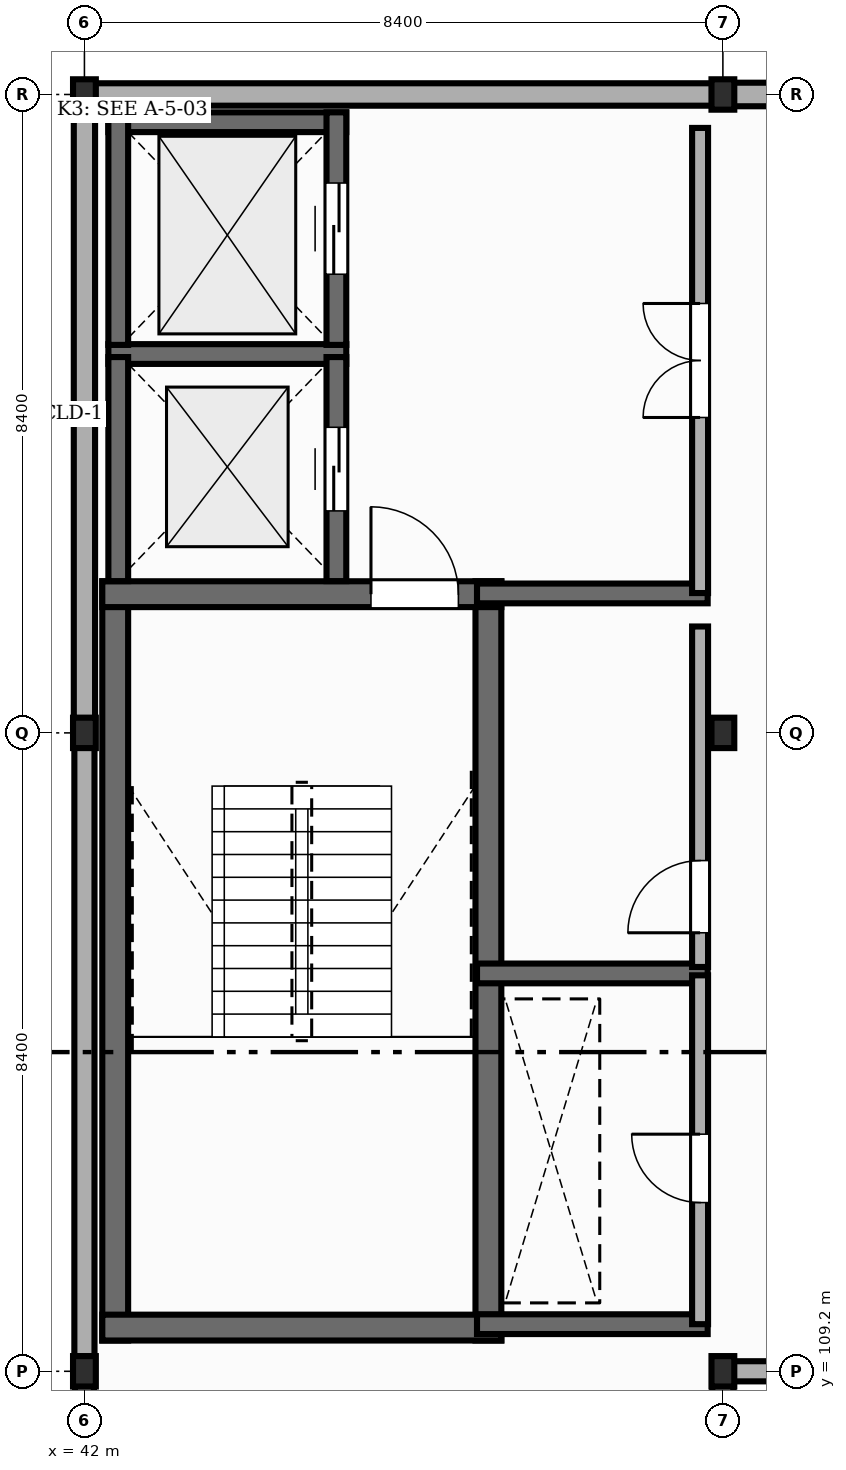
"""IFC4 building model, lengths in metres.
Left out: names, types, materials, properties, quantities, classifications, styles, units other than length and angle.
Written with IfcOpenShell. Run it as: python <this file> out.ifc"""

import sys

from ifc_helpers import new_model, si_unit, direction, frame, frame_2d, origin, origin_2d, place, context, subcontext, project, spatial, rectangle, i_section, extrude, element, fill, save


model = new_model("IFC4")
c1 = context("Model", 3, precision=1e-05, world=origin(), true_north=direction((0.0, 1.0)))
c2 = subcontext(c1, "Body", "Model", "MODEL_VIEW")
j1 = project(units=[si_unit("LENGTHUNIT", "METRE"), si_unit("PLANEANGLEUNIT", "RADIAN")], contexts=[c1])
p1 = place(None, origin())
s1 = spatial("IfcSite", under=j1, at=p1, CompositionType="ELEMENT")
p2 = place(p1, origin())
s2 = spatial("IfcBuilding", under=s1, at=p2, CompositionType="ELEMENT")
p3 = place(p2, frame((0.0, 0.0, 18.0)))
s3 = spatial("IfcBuildingStorey", under=s2, at=p3, CompositionType="ELEMENT", Elevation=18.0)
for number, where, z_axis, x_axis in (
    (1, (42.0, 109.2, 0.0), (0.0, 0.0, 1.0), (1.0, 0.0, 0.0)),
    (2, (42.0, 117.6, 0.0), (0.0, 0.0, 1.0), (1.0, 0.0, 0.0)),
    (3, (42.0, 126.0, 0.0), (0.0, 0.0, 1.0), (1.0, 0.0, 0.0)),
    (4, (50.4, 109.2, 0.0), (0.0, 0.0, 1.0), (1.0, 0.0, 0.0)),
    (5, (50.4, 117.6, 0.0), (0.0, 0.0, 1.0), (1.0, 0.0, 0.0)),
    (6, (50.4, 126.0, 0.0), (0.0, 0.0, 1.0), (1.0, 0.0, 0.0)),
):
    element("IfcColumn", number, at=place(p3, frame(where, z_axis=z_axis, x_axis=x_axis)), inside=s3, PredefinedType="COLUMN", context=c2, shape_type="SweptSolid", body=[
        extrude(i_section(OverallWidth=0.3, OverallDepth=0.4, WebThickness=0.013, FlangeThickness=0.024, FilletRadius=0.027, at=origin_2d()), origin(), (0.0, 0.0, 1.0), 4.05),
    ])
p4 = place(p3, frame((58.792, 126.0, 0.0), z_axis=(0.0, 0.0, 1.0), x_axis=(-1.0, 0.0, 0.0)))
e7 = element("IfcWall", 7, at=p4, inside=s3, PredefinedType="STANDARD", context=c2, shape_type="SweptSolid", body=[
    extrude(rectangle(XDim=8.384, YDim=0.31, at=frame_2d((4.192, 0.0))), origin(), (0.0, 0.0, 1.0), 3.522),
])
p5 = place(p3, frame((50.392, 126.0, 0.0), z_axis=(0.0, 0.0, 1.0), x_axis=(-1.0, 0.0, 0.0)))
e8 = element("IfcWall", 8, at=p5, inside=s3, PredefinedType="STANDARD", context=c2, shape_type="SweptSolid", body=[
    extrude(rectangle(XDim=8.384, YDim=0.295, at=frame_2d((4.192, 0.0))), origin(), (0.0, 0.0, 1.0), 3.492),
])
p6 = place(p3, frame((42.0, 125.804, 0.0), z_axis=(0.0, 0.0, 1.0), x_axis=(0.0, -1.0, 0.0)))
e9 = element("IfcWall", 9, at=p6, inside=s3, PredefinedType="STANDARD", context=c2, shape_type="SweptSolid", body=[
    extrude(rectangle(XDim=8.008, YDim=0.28, at=frame_2d((4.004, 0.0))), origin(), (0.0, 0.0, 1.0), 3.582),
])
p7 = place(p3, frame((42.0, 117.404, 0.0), z_axis=(0.0, 0.0, 1.0), x_axis=(0.0, -1.0, 0.0)))
e10 = element("IfcWall", 10, at=p7, inside=s3, PredefinedType="STANDARD", context=c2, shape_type="SweptSolid", body=[
    extrude(rectangle(XDim=8.008, YDim=0.265, at=frame_2d((4.004, 0.0))), origin(), (0.0, 0.0, 1.0), 3.492),
])
p8 = place(p3, frame((42.0, 109.004, 0.0), z_axis=(0.0, 0.0, 1.0), x_axis=(0.0, -1.0, 0.0)))
e11 = element("IfcWall", 11, at=p8, inside=s3, PredefinedType="STANDARD", context=c2, shape_type="SweptSolid", body=[
    extrude(rectangle(XDim=8.058, YDim=0.25, at=frame_2d((4.029, 0.0))), origin(), (0.0, 0.0, 1.0), 3.562),
])
p9 = place(p3, frame((50.4, 100.946, 0.0), z_axis=(0.0, 0.0, 1.0), x_axis=(0.0, 1.0, 0.0)))
e12 = element("IfcWall", 12, at=p9, inside=s3, PredefinedType="STANDARD", context=c2, shape_type="SweptSolid", body=[
    extrude(rectangle(XDim=8.058, YDim=0.28, at=frame_2d((4.029, 0.0))), origin(), (0.0, 0.0, 1.0), 3.472),
])
p10 = place(p3, frame((50.408, 109.2, 0.0), z_axis=(0.0, 0.0, 1.0), x_axis=(1.0, 0.0, 0.0)))
e13 = element("IfcWall", 13, at=p10, inside=s3, PredefinedType="STANDARD", context=c2, shape_type="SweptSolid", body=[
    extrude(rectangle(XDim=8.384, YDim=0.265, at=frame_2d((4.192, 0.0))), origin(), (0.0, 0.0, 1.0), 3.522),
])
for number, where, z_axis, x_axis in (
    (14, (42.405, 109.605, 0.0), (0.0, 0.0, 1.0), (0.0, 1.0, 0.0)),
    (15, (47.315, 109.605, 0.0), (0.0, 0.0, 1.0), (0.0, 1.0, 0.0)),
):
    element("IfcWall", number, at=place(p3, frame(where, z_axis=z_axis, x_axis=x_axis)), inside=s3, PredefinedType="SHEAR", context=c2, shape_type="SweptSolid", body=[
        extrude(rectangle(XDim=9.99, YDim=0.34, at=frame_2d((4.995, 0.0))), origin(), (0.0, 0.0, 1.0), 3.85),
    ])
p11 = place(p3, frame((42.235, 109.775, 0.0), z_axis=(0.0, 0.0, 1.0), x_axis=(1.0, 0.0, 0.0)))
e16 = element("IfcWall", 16, at=p11, inside=s3, PredefinedType="SHEAR", context=c2, shape_type="SweptSolid", body=[
    extrude(rectangle(XDim=5.25, YDim=0.34, at=frame_2d((2.625, 0.0))), origin(), (0.0, 0.0, 1.0), 3.85),
])
p12 = place(p3, frame((42.235, 119.425, 0.0), z_axis=(0.0, 0.0, 1.0), x_axis=(1.0, 0.0, 0.0)))
e17 = element("IfcWall", 17, at=p12, inside=s3, PredefinedType="SHEAR", context=c2, shape_type="SweptSolid", body=[
    extrude(rectangle(XDim=5.25, YDim=0.34, at=frame_2d((2.625, 0.0))), origin(), (0.0, 0.0, 1.0), 3.85),
])
p13 = place(p12, frame((3.535, 0.0, 0.0)))
e18 = element("IfcOpeningElement", 18, at=p13, cuts=e17, PredefinedType="OPENING", context=c2, shape_type="SweptSolid", body=[
    extrude(rectangle(XDim=1.15, YDim=2.15, at=frame_2d((0.575, 1.075))), frame((0.0, 0.18, 0.0), z_axis=(0.0, -1.0, 0.0), x_axis=(1.0, 0.0, 0.0)), (0.0, 0.0, 1.0), 0.36),
])
p14 = place(p3, frame((42.315, 122.585, 0.0), z_axis=(0.0, 0.0, 1.0), x_axis=(1.0, 0.0, 0.0)))
e19 = element("IfcWall", 19, at=p14, inside=s3, PredefinedType="SHEAR", context=c2, shape_type="SweptSolid", body=[
    extrude(rectangle(XDim=3.13, YDim=0.26, at=frame_2d((1.565, 0.0))), origin(), (0.0, 0.0, 1.0), 3.85),
])
p15 = place(p3, frame((42.445, 119.597, 0.0), z_axis=(0.0, 0.0, 1.0), x_axis=(0.0, 1.0, 0.0)))
e20 = element("IfcWall", 20, at=p15, inside=s3, PredefinedType="SHEAR", context=c2, shape_type="SweptSolid", body=[
    extrude(rectangle(XDim=2.948, YDim=0.26, at=frame_2d((1.474, 0.0))), origin(), (0.0, 0.0, 1.0), 3.85),
])
p16 = place(p3, frame((45.315, 119.597, 0.0), z_axis=(0.0, 0.0, 1.0), x_axis=(0.0, 1.0, 0.0)))
e21 = element("IfcWall", 21, at=p16, inside=s3, PredefinedType="SHEAR", context=c2, shape_type="SweptSolid", body=[
    extrude(rectangle(XDim=2.948, YDim=0.26, at=frame_2d((1.474, 0.0))), origin(), (0.0, 0.0, 1.0), 3.85),
])
p17 = place(p16, frame((0.924, 0.0, 0.0)))
e22 = element("IfcOpeningElement", 22, at=p17, cuts=e21, PredefinedType="OPENING", context=c2, shape_type="SweptSolid", body=[
    extrude(rectangle(XDim=1.1, YDim=2.15, at=frame_2d((0.55, 1.075))), frame((0.0, 0.14, 0.0), z_axis=(0.0, -1.0, 0.0), x_axis=(1.0, 0.0, 0.0)), (0.0, 0.0, 1.0), 0.28),
])
p18 = place(p3, frame((42.315, 125.635, 0.0), z_axis=(0.0, 0.0, 1.0), x_axis=(1.0, 0.0, 0.0)))
e23 = element("IfcWall", 23, at=p18, inside=s3, PredefinedType="SHEAR", context=c2, shape_type="SweptSolid", body=[
    extrude(rectangle(XDim=3.13, YDim=0.26, at=frame_2d((1.565, 0.0))), origin(), (0.0, 0.0, 1.0), 3.85),
])
p19 = place(p3, frame((42.445, 122.705, 0.0), z_axis=(0.0, 0.0, 1.0), x_axis=(0.0, 1.0, 0.0)))
e24 = element("IfcWall", 24, at=p19, inside=s3, PredefinedType="SHEAR", context=c2, shape_type="SweptSolid", body=[
    extrude(rectangle(XDim=3.06, YDim=0.26, at=frame_2d((1.53, 0.0))), origin(), (0.0, 0.0, 1.0), 3.85),
])
p20 = place(p3, frame((45.315, 122.705, 0.0), z_axis=(0.0, 0.0, 1.0), x_axis=(0.0, 1.0, 0.0)))
e25 = element("IfcWall", 25, at=p20, inside=s3, PredefinedType="SHEAR", context=c2, shape_type="SweptSolid", body=[
    extrude(rectangle(XDim=3.06, YDim=0.26, at=frame_2d((1.53, 0.0))), origin(), (0.0, 0.0, 1.0), 3.85),
])
p21 = place(p20, frame((0.93, 0.0, 0.0)))
e26 = element("IfcOpeningElement", 26, at=p21, cuts=e25, PredefinedType="OPENING", context=c2, shape_type="SweptSolid", body=[
    extrude(rectangle(XDim=1.2, YDim=2.15, at=frame_2d((0.6, 1.075))), frame((0.0, 0.14, 0.0), z_axis=(0.0, -1.0, 0.0), x_axis=(1.0, 0.0, 0.0)), (0.0, 0.0, 1.0), 0.28),
])
for number, where, z_axis, x_axis in (
    (27, (47.165, 109.82, 0.0), (0.0, 0.0, 1.0), (1.0, 0.0, 0.0)),
    (28, (47.165, 114.435, 0.0), (0.0, 0.0, 1.0), (1.0, 0.0, 0.0)),
    (29, (47.165, 119.435, 0.0), (0.0, 0.0, 1.0), (1.0, 0.0, 0.0)),
):
    element("IfcWall", number, at=place(p3, frame(where, z_axis=z_axis, x_axis=x_axis)), inside=s3, PredefinedType="SHEAR", context=c2, shape_type="SweptSolid", body=[
        extrude(rectangle(XDim=3.035, YDim=0.26, at=frame_2d((1.518, 0.0))), origin(), (0.0, 0.0, 1.0), 3.85),
    ])
p22 = place(p3, frame((50.1, 109.82, 0.0), z_axis=(0.0, 0.0, 1.0), x_axis=(0.0, 1.0, 0.0)))
e30 = element("IfcWall", 30, at=p22, inside=s3, PredefinedType="STANDARD", context=c2, shape_type="SweptSolid", body=[
    extrude(rectangle(XDim=4.59, YDim=0.21, at=frame_2d((2.295, 0.0))), origin(), (0.0, 0.0, 1.0), 3.252),
])
p23 = place(p22, frame((1.6, 0.0, 0.0)))
e31 = element("IfcOpeningElement", 31, at=p23, cuts=e30, PredefinedType="OPENING", context=c2, shape_type="SweptSolid", body=[
    extrude(rectangle(XDim=0.9, YDim=2.1, at=frame_2d((0.45, 1.05))), frame((0.0, 0.115, 0.0), z_axis=(0.0, -1.0, 0.0), x_axis=(1.0, 0.0, 0.0)), (0.0, 0.0, 1.0), 0.23),
])
p24 = place(p3, frame((50.1, 114.52, 0.0), z_axis=(0.0, 0.0, 1.0), x_axis=(0.0, 1.0, 0.0)))
e32 = element("IfcWall", 32, at=p24, inside=s3, PredefinedType="STANDARD", context=c2, shape_type="SweptSolid", body=[
    extrude(rectangle(XDim=4.48, YDim=0.21, at=frame_2d((2.24, 0.0))), origin(), (0.0, 0.0, 1.0), 3.252),
])
p25 = place(p24, frame((0.45, 0.0, 0.0)))
e33 = element("IfcOpeningElement", 33, at=p25, cuts=e32, PredefinedType="OPENING", context=c2, shape_type="SweptSolid", body=[
    extrude(rectangle(XDim=0.95, YDim=2.15, at=frame_2d((0.475, 1.075))), frame((0.0, 0.115, 0.0), z_axis=(0.0, -1.0, 0.0), x_axis=(1.0, 0.0, 0.0)), (0.0, 0.0, 1.0), 0.23),
])
p26 = place(p3, frame((50.1, 119.44, 0.0), z_axis=(0.0, 0.0, 1.0), x_axis=(0.0, 1.0, 0.0)))
e34 = element("IfcWall", 34, at=p26, inside=s3, PredefinedType="STANDARD", context=c2, shape_type="SweptSolid", body=[
    extrude(rectangle(XDim=6.12, YDim=0.21, at=frame_2d((3.06, 0.0))), origin(), (0.0, 0.0, 1.0), 3.362),
])
p27 = place(p26, frame((2.31, 0.0, 0.0)))
e35 = element("IfcOpeningElement", 35, at=p27, cuts=e34, PredefinedType="OPENING", context=c2, shape_type="SweptSolid", body=[
    extrude(rectangle(XDim=1.5, YDim=2.2, at=frame_2d((0.75, 1.1))), frame((0.0, 0.115, 0.0), z_axis=(0.0, -1.0, 0.0), x_axis=(1.0, 0.0, 0.0)), (0.0, 0.0, 1.0), 0.23),
])
p28 = place(p13, origin())
e36 = element("IfcDoor", 36, at=p28, inside=s3, OperationType="SINGLE_SWING_LEFT", PredefinedType="DOOR", context=c2, shape_type="SweptSolid", body=[
    extrude(rectangle(XDim=1.15, YDim=2.15, at=frame_2d((0.575, 1.075))), frame((0.0, 0.025, 0.0), z_axis=(0.0, -1.0, 0.0), x_axis=(1.0, 0.0, 0.0)), (0.0, 0.0, 1.0), 0.05),
])
fill(e18, e36)
p29 = place(p17, origin())
e37 = element("IfcDoor", 37, at=p29, inside=s3, OperationType="DOUBLE_DOOR_SLIDING", PredefinedType="DOOR", context=c2, shape_type="SweptSolid", body=[
    extrude(rectangle(XDim=1.1, YDim=2.15, at=frame_2d((0.55, 1.075))), frame((0.0, 0.025, 0.0), z_axis=(0.0, -1.0, 0.0), x_axis=(1.0, 0.0, 0.0)), (0.0, 0.0, 1.0), 0.05),
])
fill(e22, e37)
p30 = place(p21, origin())
e38 = element("IfcDoor", 38, at=p30, inside=s3, OperationType="DOUBLE_DOOR_SLIDING", PredefinedType="DOOR", context=c2, shape_type="SweptSolid", body=[
    extrude(rectangle(XDim=1.2, YDim=2.15, at=frame_2d((0.6, 1.075))), frame((0.0, 0.025, 0.0), z_axis=(0.0, -1.0, 0.0), x_axis=(1.0, 0.0, 0.0)), (0.0, 0.0, 1.0), 0.05),
])
fill(e26, e38)
p31 = place(p23, origin())
e39 = element("IfcDoor", 39, at=p31, inside=s3, OperationType="SINGLE_SWING_RIGHT", PredefinedType="DOOR", context=c2, shape_type="SweptSolid", body=[
    extrude(rectangle(XDim=0.9, YDim=2.1, at=frame_2d((0.45, 1.05))), frame((0.0, 0.025, 0.0), z_axis=(0.0, -1.0, 0.0), x_axis=(1.0, 0.0, 0.0)), (0.0, 0.0, 1.0), 0.05),
])
fill(e31, e39)
p32 = place(p25, origin())
e40 = element("IfcDoor", 40, at=p32, inside=s3, OperationType="SINGLE_SWING_LEFT", PredefinedType="DOOR", context=c2, shape_type="SweptSolid", body=[
    extrude(rectangle(XDim=0.95, YDim=2.15, at=frame_2d((0.475, 1.075))), frame((0.0, 0.025, 0.0), z_axis=(0.0, -1.0, 0.0), x_axis=(1.0, 0.0, 0.0)), (0.0, 0.0, 1.0), 0.05),
])
fill(e33, e40)
p33 = place(p27, origin())
e41 = element("IfcDoor", 41, at=p33, inside=s3, OperationType="DOUBLE_DOOR_SINGLE_SWING", PredefinedType="DOOR", context=c2, shape_type="SweptSolid", body=[
    extrude(rectangle(XDim=1.5, YDim=2.2, at=frame_2d((0.75, 1.1))), frame((0.0, 0.025, 0.0), z_axis=(0.0, -1.0, 0.0), x_axis=(1.0, 0.0, 0.0)), (0.0, 0.0, 1.0), 0.05),
])
fill(e35, e41)
save(model, sys.argv[1])
